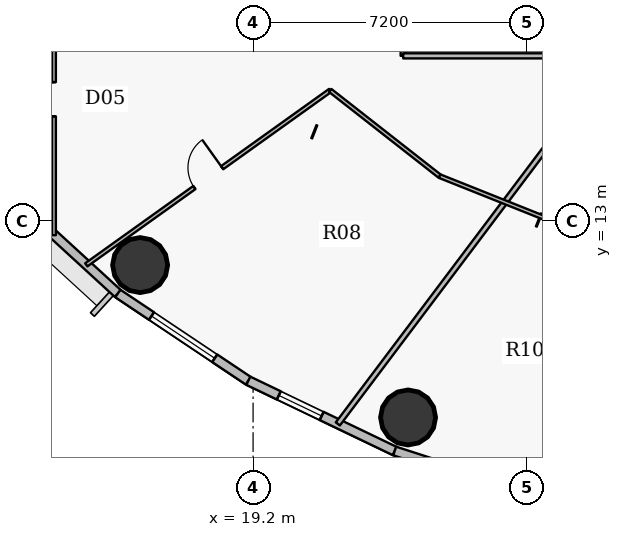
"""IFC4 building model, lengths in metres.
Left out: names, types, materials, properties, quantities, classifications, styles, units other than length and angle.
Written with IfcOpenShell. Run it as: python <this file> out.ifc"""

import sys

from ifc_helpers import new_model, si_unit, direction, frame, frame_2d, origin, origin_2d, place, context, subcontext, project, spatial, rectangle, hollow_circle, extrude, source, transform, mapped, element, fill, save


model = new_model("IFC4")
c1 = context("Model", 3, precision=1e-05, world=origin(), true_north=direction((0.0, 1.0)))
c2 = subcontext(c1, "Body", "Model", "MODEL_VIEW")
j1 = project(units=[si_unit("LENGTHUNIT", "METRE"), si_unit("PLANEANGLEUNIT", "RADIAN")], contexts=[c1])
p1 = place(None, origin())
s1 = spatial("IfcSite", under=j1, at=p1, CompositionType="ELEMENT")
p2 = place(p1, origin())
s2 = spatial("IfcBuilding", under=s1, at=p2, CompositionType="ELEMENT")
p3 = place(p2, frame((0.0, 0.0, 112.2)))
s3 = spatial("IfcBuildingStorey", under=s2, at=p3, CompositionType="ELEMENT", Elevation=112.2)
for number, where, z_axis, x_axis in (
    (1, (16.227, 11.844, 0.0), (0.0, 0.0, 1.0), (1.0, 0.0, 0.0)),
    (2, (23.278, 7.835, 0.0), (0.0, 0.0, 1.0), (1.0, 0.0, 0.0)),
):
    element("IfcColumn", number, at=place(p3, frame(where, z_axis=z_axis, x_axis=x_axis)), inside=s3, PredefinedType="COLUMN", context=c2, shape_type="SweptSolid", body=[
        extrude(hollow_circle(Radius=0.725, WallThickness=0.042, at=origin_2d()), origin(), (0.0, 0.0, 1.0), 3.75),
    ])
p4 = place(p3, frame((15.642, 11.097, 0.0), z_axis=(0.0, 0.0, 1.0), x_axis=(-0.737113356241, 0.675769117414, 0.0)))
e3 = element("IfcWall", 3, at=p4, inside=s3, PredefinedType="SOLIDWALL", context=c2, shape_type="SweptSolid", body=[
    extrude(rectangle(XDim=3.976, YDim=0.24, at=frame_2d((1.988, 0.0))), origin(), (0.0, 0.0, 1.0), 3.5),
])
p5 = place(p4, frame((2.546, 0.0, 0.9)))
e4 = element("IfcOpeningElement", 4, at=p5, cuts=e3, PredefinedType="OPENING", context=c2, shape_type="SweptSolid", body=[
    extrude(rectangle(XDim=1.25, YDim=1.65, at=origin_2d()), frame((0.625, 0.13, 0.825), z_axis=(0.0, -1.0, 0.0), x_axis=(1.0, 0.0, 0.0)), (0.0, 0.0, 1.0), 0.26),
])
p6 = place(p3, frame((19.075, 8.801, 0.0), z_axis=(0.0, 0.0, 1.0), x_axis=(-0.831221811447, 0.555940914284, 0.0)))
e5 = element("IfcWall", 5, at=p6, inside=s3, PredefinedType="SOLIDWALL", context=c2, shape_type="SweptSolid", body=[
    extrude(rectangle(XDim=4.13, YDim=0.24, at=frame_2d((2.065, 0.0))), origin(), (0.0, 0.0, 1.0), 3.5),
])
p7 = place(p6, frame((1.065, 0.0, 0.9)))
e6 = element("IfcOpeningElement", 6, at=p7, cuts=e5, PredefinedType="OPENING", context=c2, shape_type="SweptSolid", body=[
    extrude(rectangle(XDim=2.0, YDim=1.75, at=origin_2d()), frame((1.0, 0.13, 0.875), z_axis=(0.0, -1.0, 0.0), x_axis=(1.0, 0.0, 0.0)), (0.0, 0.0, 1.0), 0.26),
])
p8 = place(p3, frame((22.926, 6.953, 0.0), z_axis=(0.0, 0.0, 1.0), x_axis=(-0.901589935876, 0.432591709962, 0.0)))
e7 = element("IfcWall", 7, at=p8, inside=s3, PredefinedType="SOLIDWALL", context=c2, shape_type="SweptSolid", body=[
    extrude(rectangle(XDim=4.272, YDim=0.24, at=frame_2d((2.136, 0.0))), origin(), (0.0, 0.0, 1.0), 3.5),
])
p9 = place(p8, frame((2.132, 0.0, 0.9)))
e8 = element("IfcOpeningElement", 8, at=p9, cuts=e7, PredefinedType="OPENING", context=c2, shape_type="SweptSolid", body=[
    extrude(rectangle(XDim=1.25, YDim=1.65, at=origin_2d()), frame((0.625, 0.13, 0.825), z_axis=(0.0, -1.0, 0.0), x_axis=(1.0, 0.0, 0.0)), (0.0, 0.0, 1.0), 0.26),
])
p10 = place(p3, frame((27.1, 5.599, 0.0), z_axis=(0.0, 0.0, 1.0), x_axis=(-0.951211346073, 0.308540070495, 0.0)))
e9 = element("IfcWall", 9, at=p10, inside=s3, PredefinedType="SOLIDWALL", context=c2, shape_type="SweptSolid", body=[
    extrude(rectangle(XDim=4.388, YDim=0.24, at=frame_2d((2.194, 0.0))), origin(), (0.0, 0.0, 1.0), 3.5),
])
p11 = place(p10, frame((1.194, 0.0, 0.9)))
e10 = element("IfcOpeningElement", 10, at=p11, cuts=e9, PredefinedType="OPENING", context=c2, shape_type="SweptSolid", body=[
    extrude(rectangle(XDim=2.0, YDim=1.75, at=origin_2d()), frame((1.0, 0.13, 0.875), z_axis=(0.0, -1.0, 0.0), x_axis=(1.0, 0.0, 0.0)), (0.0, 0.0, 1.0), 0.26),
])
p12 = place(p3, frame((13.96, 12.631, 0.0), z_axis=(0.0, 0.0, 1.0), x_axis=(0.0, 1.0, 0.0)))
e11 = element("IfcWall", 11, at=p12, inside=s3, PredefinedType="PARTITIONING", context=c2, shape_type="SweptSolid", body=[
    extrude(rectangle(XDim=7.154, YDim=0.1, at=frame_2d((3.577, 0.0))), origin(), (0.0, 0.0, 1.0), 2.935),
])
p13 = place(p12, frame((3.127, 0.0, 0.0)))
e12 = element("IfcOpeningElement", 12, at=p13, cuts=e11, PredefinedType="OPENING", context=c2, shape_type="SweptSolid", body=[
    extrude(rectangle(XDim=0.9, YDim=2.1, at=origin_2d()), frame((0.45, 0.06, 1.05), z_axis=(0.0, -1.0, 0.0), x_axis=(1.0, 0.0, 0.0)), (0.0, 0.0, 1.0), 0.12),
])
p14 = place(p3, frame((14.811, 11.851, 0.0), z_axis=(0.0, 0.0, 1.0), x_axis=(0.813476205606, 0.581598197137, 0.0)))
e13 = element("IfcWall", 13, at=p14, inside=s3, PredefinedType="PARTITIONING", context=c2, shape_type="SweptSolid", body=[
    extrude(rectangle(XDim=7.889, YDim=0.1, at=frame_2d((3.945, 0.0))), origin(), (0.0, 0.0, 1.0), 2.935),
])
p15 = place(p14, frame((3.495, 0.0, 0.0)))
e14 = element("IfcOpeningElement", 14, at=p15, cuts=e13, PredefinedType="OPENING", context=c2, shape_type="SweptSolid", body=[
    extrude(rectangle(XDim=0.9, YDim=2.1, at=origin_2d()), frame((0.45, 0.06, 1.05), z_axis=(0.0, -1.0, 0.0), x_axis=(1.0, 0.0, 0.0)), (0.0, 0.0, 1.0), 0.12),
])
p16 = place(p3, frame((21.229, 16.44, 0.0), z_axis=(0.0, 0.0, 1.0), x_axis=(0.787324700524, -0.616538576201, 0.0)))
e15 = element("IfcWall", 15, at=p16, inside=s3, PredefinedType="PARTITIONING", context=c2, shape_type="SweptSolid", body=[
    extrude(rectangle(XDim=3.658, YDim=0.1, at=frame_2d((1.829, 0.0))), origin(), (0.0, 0.0, 1.0), 2.935),
])
p17 = place(p3, frame((21.43, 7.665, 0.0), z_axis=(0.0, 0.0, 1.0), x_axis=(0.601821582461, 0.798630567211, 0.0)))
e16 = element("IfcWall", 16, at=p17, inside=s3, PredefinedType="PARTITIONING", context=c2, shape_type="SweptSolid", body=[
    extrude(rectangle(XDim=12.127, YDim=0.135, at=frame_2d((6.063, 0.0))), origin(), (0.0, 0.0, 1.0), 2.935),
])
p18 = place(p3, frame((23.15, 17.35, 0.0), z_axis=(0.0, 0.0, 1.0), x_axis=(0.0, 1.0, 0.0)))
e17 = element("IfcWall", 17, at=p18, inside=s3, PredefinedType="PARTITIONING", context=c2, shape_type="SweptSolid", body=[
    extrude(rectangle(XDim=19.3, YDim=0.135, at=frame_2d((9.65, 0.0))), origin(), (0.0, 0.0, 1.0), 2.935),
])
p19 = place(p18, frame((15.889, 0.0, 0.0)))
e18 = element("IfcOpeningElement", 18, at=p19, cuts=e17, PredefinedType="OPENING", context=c2, shape_type="SweptSolid", body=[
    extrude(rectangle(XDim=1.0, YDim=2.15, at=origin_2d()), frame((0.5, 0.078, 1.075), z_axis=(0.0, -1.0, 0.0), x_axis=(1.0, 0.0, 0.0)), (0.0, 0.0, 1.0), 0.155),
])
p20 = place(p18, frame((6.279, 0.0, 0.0)))
e19 = element("IfcOpeningElement", 19, at=p20, cuts=e17, PredefinedType="OPENING", context=c2, shape_type="SweptSolid", body=[
    extrude(rectangle(XDim=1.0, YDim=2.15, at=origin_2d()), frame((0.5, 0.078, 1.075), z_axis=(0.0, -1.0, 0.0), x_axis=(1.0, 0.0, 0.0)), (0.0, 0.0, 1.0), 0.155),
])
p21 = place(p3, frame((23.15, 17.35, 0.0), z_axis=(0.0, 0.0, 1.0), x_axis=(1.0, 0.0, 0.0)))
e20 = element("IfcWall", 20, at=p21, inside=s3, PredefinedType="PARTITIONING", context=c2, shape_type="SweptSolid", body=[
    extrude(rectangle(XDim=12.808, YDim=0.135, at=frame_2d((6.404, 0.0))), origin(), (0.0, 0.0, 1.0), 2.935),
])
p22 = place(p21, frame((8.673, 0.0, 0.0)))
e21 = element("IfcOpeningElement", 21, at=p22, cuts=e20, PredefinedType="OPENING", context=c2, shape_type="SweptSolid", body=[
    extrude(rectangle(XDim=1.0, YDim=2.15, at=origin_2d()), frame((0.5, 0.078, 1.075), z_axis=(0.0, -1.0, 0.0), x_axis=(1.0, 0.0, 0.0)), (0.0, 0.0, 1.0), 0.155),
])
p23 = place(p3, frame((24.109, 14.184, 0.0), z_axis=(0.0, 0.0, 1.0), x_axis=(0.928803554156, -0.370572473055, 0.0)))
e22 = element("IfcWall", 22, at=p23, inside=s3, PredefinedType="PARTITIONING", context=c2, shape_type="SweptSolid", body=[
    extrude(rectangle(XDim=6.072, YDim=0.1, at=frame_2d((3.036, 0.0))), origin(), (0.0, 0.0, 1.0), 2.935),
])
m1 = source(origin(), c2, "Body", "SweptSolid", [
    extrude(rectangle(XDim=2.0, YDim=1.75, at=origin_2d()), frame((1.0, 0.03, 0.875), z_axis=(0.0, -1.0, 0.0), x_axis=(1.0, 0.0, 0.0)), (0.0, 0.0, 1.0), 0.06),
])
p24 = place(p7, origin())
e23 = element("IfcWindow", 23, at=p24, inside=s3, PartitioningType="DOUBLE_PANEL_VERTICAL", PredefinedType="WINDOW", context=c2, shape_type="MappedRepresentation", body=[
    mapped(m1, transform((0.0, 0.0, 0.0), x_axis=(1.0, 0.0, 0.0), y_axis=(0.0, 1.0, 0.0), z_axis=(0.0, 0.0, 1.0), scale=1.0)),
])
fill(e6, e23)
m2 = source(origin(), c2, "Body", "SweptSolid", [
    extrude(rectangle(XDim=1.25, YDim=1.65, at=origin_2d()), frame((0.625, 0.03, 0.825), z_axis=(0.0, -1.0, 0.0), x_axis=(1.0, 0.0, 0.0)), (0.0, 0.0, 1.0), 0.06),
])
p25 = place(p9, origin())
e24 = element("IfcWindow", 24, at=p25, inside=s3, PartitioningType="SINGLE_PANEL", PredefinedType="WINDOW", context=c2, shape_type="MappedRepresentation", body=[
    mapped(m2, transform((0.0, 0.0, 0.0), x_axis=(1.0, 0.0, 0.0), y_axis=(0.0, 1.0, 0.0), z_axis=(0.0, 0.0, 1.0), scale=1.0)),
])
fill(e8, e24)
m3 = source(origin(), c2, "Body", "SweptSolid", [
    extrude(rectangle(XDim=0.9, YDim=2.1, at=origin_2d()), frame((0.45, 0.025, 1.05), z_axis=(0.0, -1.0, 0.0), x_axis=(1.0, 0.0, 0.0)), (0.0, 0.0, 1.0), 0.05),
])
p26 = place(p15, origin())
e25 = element("IfcDoor", 25, at=p26, inside=s3, OperationType="SINGLE_SWING_RIGHT", PredefinedType="DOOR", context=c2, shape_type="MappedRepresentation", body=[
    mapped(m3, transform((0.0, 0.0, 0.0), x_axis=(1.0, 0.0, 0.0), y_axis=(0.0, 1.0, 0.0), z_axis=(0.0, 0.0, 1.0), scale=1.0)),
])
fill(e14, e25)
p27 = place(p13, origin())
e26 = element("IfcDoor", 26, at=p27, inside=s3, OperationType="SINGLE_SWING_RIGHT", PredefinedType="DOOR", context=c2, shape_type="MappedRepresentation", body=[
    mapped(m3, transform((0.0, 0.0, 0.0), x_axis=(1.0, 0.0, 0.0), y_axis=(0.0, 1.0, 0.0), z_axis=(0.0, 0.0, 1.0), scale=1.0)),
])
fill(e12, e26)
save(model, sys.argv[1])
